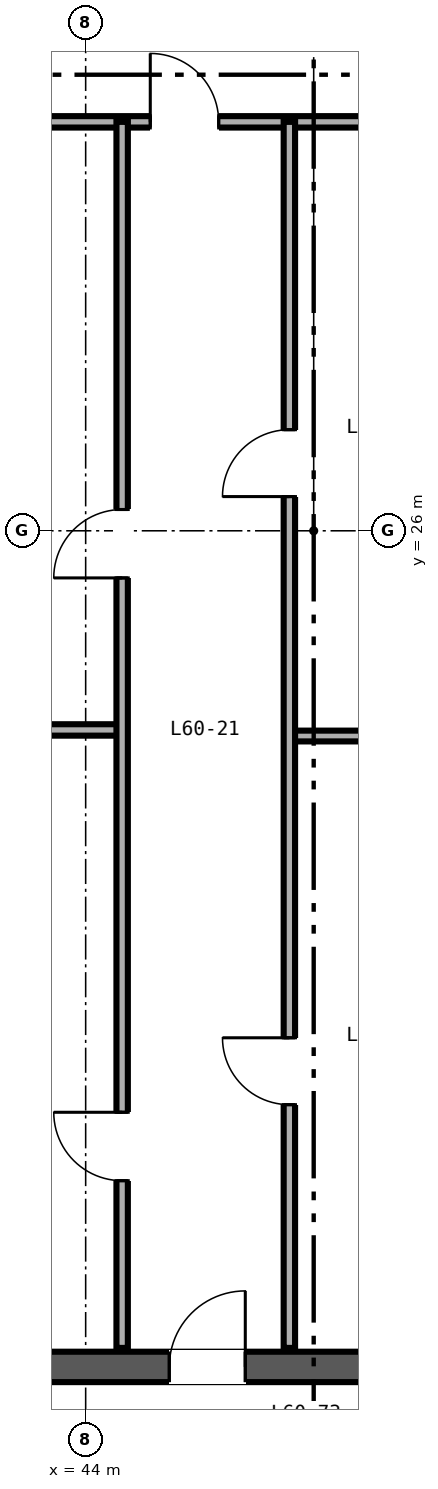
"""IFC4 building model, lengths in metres.
Left out: names, types, materials, properties, quantities, classifications, styles, units other than length and angle.
Written with IfcOpenShell. Run it as: python <this file> out.ifc"""

import sys

from ifc_helpers import new_model, si_unit, direction, frame, frame_2d, origin, place, context, subcontext, project, spatial, rectangle, extrude, source, transform, mapped, element, fill, save


model = new_model("IFC4")
c1 = context("Model", 3, precision=1e-05, world=origin(), true_north=direction((0.0, 1.0)))
c2 = subcontext(c1, "Body", "Model", "MODEL_VIEW")
j1 = project(units=[si_unit("LENGTHUNIT", "METRE"), si_unit("PLANEANGLEUNIT", "RADIAN")], contexts=[c1])
p1 = place(None, origin())
s1 = spatial("IfcSite", under=j1, at=p1, CompositionType="ELEMENT")
p2 = place(p1, origin())
s2 = spatial("IfcBuilding", under=s1, at=p2, CompositionType="ELEMENT")
p3 = place(p2, frame((0.0, 0.0, 240.0)))
s3 = spatial("IfcBuildingStorey", under=s2, at=p3, CompositionType="ELEMENT", Elevation=240.0)
p4 = place(p3, frame((40.8, 15.0, 0.0), z_axis=(0.0, 0.0, 1.0), x_axis=(1.0, 0.0, 0.0)))
e1 = element("IfcWall", 1, at=p4, inside=s3, PredefinedType="SHEAR", context=c2, shape_type="SweptSolid", body=[
    extrude(rectangle(XDim=12.4, YDim=0.4, at=frame_2d((6.2, 0.0))), origin(), (0.0, 0.0, 1.0), 3.38),
])
p5 = place(p4, frame((4.3, 0.0, 0.0)))
e2 = element("IfcOpeningElement", 2, at=p5, cuts=e1, PredefinedType="OPENING", context=c2, shape_type="SweptSolid", body=[
    extrude(rectangle(XDim=1.0, YDim=2.15, at=frame_2d((0.5, 1.075))), frame((0.0, 0.21, 0.0), z_axis=(0.0, -1.0, 0.0), x_axis=(1.0, 0.0, 0.0)), (0.0, 0.0, 1.0), 0.42),
])
p6 = place(p3, frame((41.25, 31.38, 0.0), z_axis=(0.0, 0.0, 1.0), x_axis=(1.0, 0.0, 0.0)))
e3 = element("IfcWall", 3, at=p6, inside=s3, PredefinedType="PARTITIONING", context=c2, shape_type="SweptSolid", body=[
    extrude(rectangle(XDim=7.87, YDim=0.15, at=frame_2d((3.935, 0.0))), origin(), (0.0, 0.0, 1.0), 2.48),
])
p7 = place(p6, frame((3.6, 0.0, 0.0)))
e4 = element("IfcOpeningElement", 4, at=p7, cuts=e3, PredefinedType="OPENING", context=c2, shape_type="SweptSolid", body=[
    extrude(rectangle(XDim=0.9, YDim=2.15, at=frame_2d((0.45, 1.075))), frame((0.0, 0.085, 0.0), z_axis=(0.0, -1.0, 0.0), x_axis=(1.0, 0.0, 0.0)), (0.0, 0.0, 1.0), 0.17),
])
p8 = place(p3, frame((46.68, 23.3, 0.0), z_axis=(0.0, 0.0, 1.0), x_axis=(1.0, 0.0, 0.0)))
e5 = element("IfcWall", 5, at=p8, inside=s3, PredefinedType="PARTITIONING", context=c2, shape_type="SweptSolid", body=[
    extrude(rectangle(XDim=2.44, YDim=0.142, at=frame_2d((1.22, 0.0))), origin(), (0.0, 0.0, 1.0), 3.38),
])
p9 = place(p3, frame((46.68, 15.25, 0.0), z_axis=(0.0, 0.0, 1.0), x_axis=(0.0, 1.0, 0.0)))
e6 = element("IfcWall", 6, at=p9, inside=s3, PredefinedType="PARTITIONING", context=c2, shape_type="SweptSolid", body=[
    extrude(rectangle(XDim=16.13, YDim=0.15, at=frame_2d((8.065, 0.0))), origin(), (0.0, 0.0, 1.0), 2.453),
])
p10 = place(p9, frame((3.2, 0.0, 0.0)))
e7 = element("IfcOpeningElement", 7, at=p10, cuts=e6, PredefinedType="OPENING", context=c2, shape_type="SweptSolid", body=[
    extrude(rectangle(XDim=0.88, YDim=2.15, at=frame_2d((0.44, 1.075))), frame((0.0, 0.085, 0.0), z_axis=(0.0, -1.0, 0.0), x_axis=(1.0, 0.0, 0.0)), (0.0, 0.0, 1.0), 0.17),
])
p11 = place(p9, frame((11.2, 0.0, 0.0)))
e8 = element("IfcOpeningElement", 8, at=p11, cuts=e6, PredefinedType="OPENING", context=c2, shape_type="SweptSolid", body=[
    extrude(rectangle(XDim=0.88, YDim=2.15, at=frame_2d((0.44, 1.075))), frame((0.0, 0.085, 0.0), z_axis=(0.0, -1.0, 0.0), x_axis=(1.0, 0.0, 0.0)), (0.0, 0.0, 1.0), 0.17),
])
p12 = place(p3, frame((41.25, 23.38, 0.0), z_axis=(0.0, 0.0, 1.0), x_axis=(1.0, 0.0, 0.0)))
e9 = element("IfcWall", 9, at=p12, inside=s3, PredefinedType="PARTITIONING", context=c2, shape_type="SweptSolid", body=[
    extrude(rectangle(XDim=3.23, YDim=0.15, at=frame_2d((1.615, 0.0))), origin(), (0.0, 0.0, 1.0), 3.38),
])
p13 = place(p3, frame((44.48, 15.25, 0.0), z_axis=(0.0, 0.0, 1.0), x_axis=(0.0, 1.0, 0.0)))
e10 = element("IfcWall", 10, at=p13, inside=s3, PredefinedType="PARTITIONING", context=c2, shape_type="SweptSolid", body=[
    extrude(rectangle(XDim=16.13, YDim=0.15, at=frame_2d((8.065, 0.0))), origin(), (0.0, 0.0, 1.0), 2.453),
])
p14 = place(p13, frame((2.2, 0.0, 0.0)))
e11 = element("IfcOpeningElement", 11, at=p14, cuts=e10, PredefinedType="OPENING", context=c2, shape_type="SweptSolid", body=[
    extrude(rectangle(XDim=0.9, YDim=2.15, at=frame_2d((0.45, 1.075))), frame((0.0, 0.085, 0.0), z_axis=(0.0, -1.0, 0.0), x_axis=(1.0, 0.0, 0.0)), (0.0, 0.0, 1.0), 0.17),
])
p15 = place(p13, frame((10.13, 0.0, 0.0)))
e12 = element("IfcOpeningElement", 12, at=p15, cuts=e10, PredefinedType="OPENING", context=c2, shape_type="SweptSolid", body=[
    extrude(rectangle(XDim=0.9, YDim=2.15, at=frame_2d((0.45, 1.075))), frame((0.0, 0.085, 0.0), z_axis=(0.0, -1.0, 0.0), x_axis=(1.0, 0.0, 0.0)), (0.0, 0.0, 1.0), 0.17),
])
m1 = source(origin(), c2, "Body", "SweptSolid", [
    extrude(rectangle(XDim=0.88, YDim=2.15, at=frame_2d((0.44, 1.075))), frame((0.0, 0.025, 0.0), z_axis=(0.0, -1.0, 0.0), x_axis=(1.0, 0.0, 0.0)), (0.0, 0.0, 1.0), 0.05),
])
p16 = place(p10, origin())
e13 = element("IfcDoor", 13, at=p16, inside=s3, OperationType="SINGLE_SWING_RIGHT", PredefinedType="DOOR", context=c2, shape_type="MappedRepresentation", body=[
    mapped(m1, transform((0.0, 0.0, 0.0), scale=1.0)),
])
fill(e7, e13)
p17 = place(p11, origin())
e14 = element("IfcDoor", 14, at=p17, inside=s3, OperationType="SINGLE_SWING_LEFT", PredefinedType="DOOR", context=c2, shape_type="MappedRepresentation", body=[
    mapped(m1, transform((0.0, 0.0, 0.0), scale=1.0)),
])
fill(e8, e14)
m2 = source(origin(), c2, "Body", "SweptSolid", [
    extrude(rectangle(XDim=0.9, YDim=2.15, at=frame_2d((0.45, 1.075))), frame((0.0, 0.025, 0.0), z_axis=(0.0, -1.0, 0.0), x_axis=(1.0, 0.0, 0.0)), (0.0, 0.0, 1.0), 0.05),
])
p18 = place(p7, origin())
e15 = element("IfcDoor", 15, at=p18, inside=s3, OperationType="SINGLE_SWING_LEFT", PredefinedType="DOOR", context=c2, shape_type="MappedRepresentation", body=[
    mapped(m2, transform((0.0, 0.0, 0.0), scale=1.0)),
])
fill(e4, e15)
m3 = source(origin(), c2, "Body", "SweptSolid", [
    extrude(rectangle(XDim=1.0, YDim=2.15, at=frame_2d((0.5, 1.075))), frame((0.0, 0.025, 0.0), z_axis=(0.0, -1.0, 0.0), x_axis=(1.0, 0.0, 0.0)), (0.0, 0.0, 1.0), 0.05),
])
p19 = place(p5, origin())
e16 = element("IfcDoor", 16, at=p19, inside=s3, OperationType="SINGLE_SWING_RIGHT", PredefinedType="DOOR", context=c2, shape_type="MappedRepresentation", body=[
    mapped(m3, transform((0.0, 0.0, 0.0), scale=1.0)),
])
fill(e2, e16)
p20 = place(p14, origin())
e17 = element("IfcDoor", 17, at=p20, inside=s3, OperationType="SINGLE_SWING_RIGHT", PredefinedType="DOOR", context=c2, shape_type="MappedRepresentation", body=[
    mapped(m2, transform((0.0, 0.0, 0.0), scale=1.0)),
])
fill(e11, e17)
p21 = place(p15, origin())
e18 = element("IfcDoor", 18, at=p21, inside=s3, OperationType="SINGLE_SWING_LEFT", PredefinedType="DOOR", context=c2, shape_type="MappedRepresentation", body=[
    mapped(m2, transform((0.0, 0.0, 0.0), scale=1.0)),
])
fill(e12, e18)
save(model, sys.argv[1])
